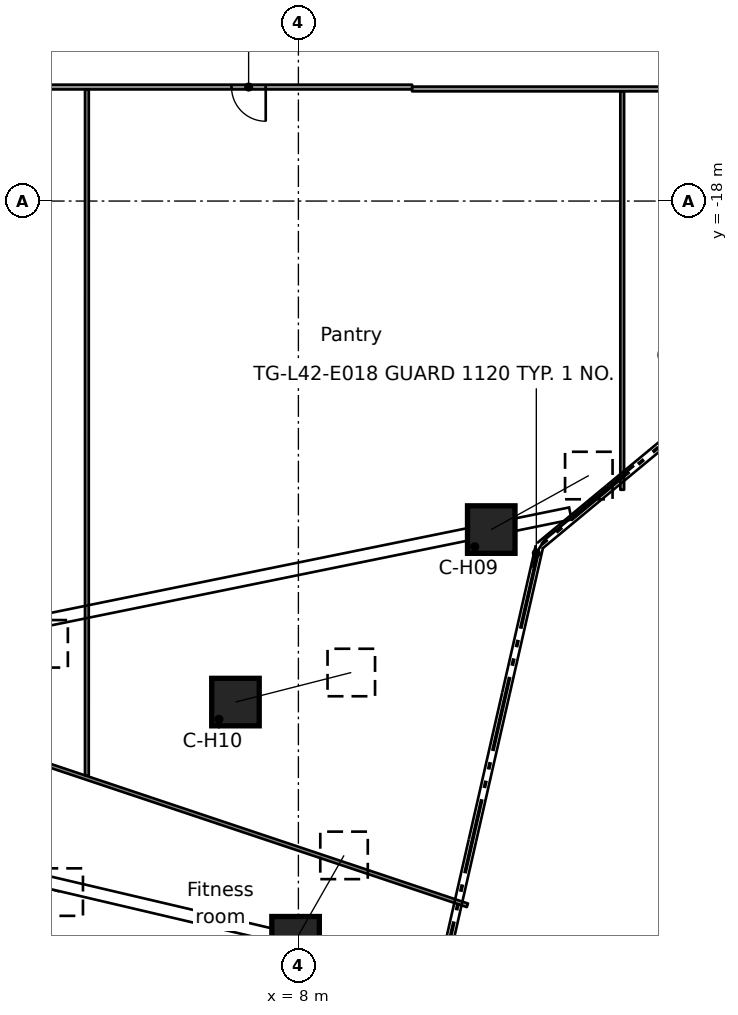
"""IFC4 building model, lengths in metres.
Left out: names, types, materials, properties, quantities, classifications, styles, units other than length and angle.
Written with IfcOpenShell. Run it as: python <this file> out.ifc"""

import sys

from ifc_helpers import new_model, si_unit, direction, frame, frame_2d, origin, origin_2d, place, context, subcontext, project, spatial, rectangle, extrude, element, fill, save


model = new_model("IFC4")
c1 = context("Model", 3, precision=1e-05, world=origin(), true_north=direction((0.0, 1.0)))
c2 = subcontext(c1, "Body", "Model", "MODEL_VIEW")
j1 = project(units=[si_unit("LENGTHUNIT", "METRE"), si_unit("PLANEANGLEUNIT", "RADIAN")], contexts=[c1])
p1 = place(None, origin())
s1 = spatial("IfcSite", under=j1, at=p1, CompositionType="ELEMENT")
p2 = place(p1, origin())
s2 = spatial("IfcBuilding", under=s1, at=p2, CompositionType="ELEMENT")
p3 = place(p2, frame((0.0, 0.0, 163.1)))
s3 = spatial("IfcBuildingStorey", under=s2, at=p3, CompositionType="ELEMENT", Elevation=163.1)
p4 = place(p3, frame((-1.558, -35.226, 0.464), z_axis=(0.712112227691, -0.208786831155, 0.670301599513), x_axis=(0.281350203926, 0.959605159819, 0.0)))
e1 = element("IfcColumn", 1, at=p4, inside=s3, PredefinedType="COLUMN", context=c2, shape_type="SweptSolid", body=[
    extrude(rectangle(XDim=1.25, YDim=1.25, at=origin_2d()), origin(), (0.0, 0.0, 1.0), 4.584),
])
p5 = place(p3, frame((7.926, -37.45, 0.39), z_axis=(0.3093960676, 0.541887482626, 0.781429478281), x_axis=(-0.868418381387, 0.495832143845, 0.0)))
e2 = element("IfcColumn", 2, at=p5, inside=s3, PredefinedType="COLUMN", context=c2, shape_type="SweptSolid", body=[
    extrude(rectangle(XDim=1.25, YDim=1.25, at=origin_2d()), origin(), (0.0, 0.0, 1.0), 4.121),
])
p6 = place(p3, frame((13.075, -26.644, 0.426), z_axis=(0.59651445167, 0.33045141997, 0.731418052818), x_axis=(-0.484583076291, 0.874745244155, 0.0)))
e3 = element("IfcColumn", 3, at=p6, inside=s3, PredefinedType="COLUMN", context=c2, shape_type="SweptSolid", body=[
    extrude(rectangle(XDim=1.25, YDim=1.25, at=origin_2d()), origin(), (0.0, 0.0, 1.0), 4.303),
])
p7 = place(p3, frame((6.344, -31.183, 0.444), z_axis=(0.68893180134, 0.175861085372, 0.703168437683), x_axis=(-0.247335189642, 0.968929978876, 0.0)))
e4 = element("IfcColumn", 4, at=p7, inside=s3, PredefinedType="COLUMN", context=c2, shape_type="SweptSolid", body=[
    extrude(rectangle(XDim=1.25, YDim=1.25, at=origin_2d()), origin(), (0.0, 0.0, 1.0), 4.424),
])
p8 = place(p3, frame((-1.625, -29.634, 0.426), z_axis=(0.681844494604, -0.003687792657, 0.731487857291), x_axis=(0.005408474731, 0.999985374094, 0.0)))
e5 = element("IfcColumn", 5, at=p8, inside=s3, PredefinedType="COLUMN", context=c2, shape_type="SweptSolid", body=[
    extrude(rectangle(XDim=1.25, YDim=1.25, at=origin_2d()), origin(), (0.0, 0.0, 1.0), 4.303),
])
p9 = place(p3, frame((-4.203, -36.872, 0.0), z_axis=(0.0, 0.0, 1.0), x_axis=(0.9483339029, -0.317274027634, 0.0)))
e6 = element("IfcWall", 6, at=p9, inside=s3, PredefinedType="PARTITIONING", context=c2, shape_type="SweptSolid", body=[
    extrude(rectangle(XDim=16.238, YDim=0.1, at=frame_2d((8.119, 0.0))), origin(), (0.0, 0.0, 1.0), 3.56),
])
p10 = place(p3, frame((-3.038, -31.35, 0.0), z_axis=(0.0, 0.0, 1.0), x_axis=(0.948347845644, -0.317232349647, 0.0)))
e7 = element("IfcWall", 7, at=p10, inside=s3, PredefinedType="PARTITIONING", context=c2, shape_type="SweptSolid", body=[
    extrude(rectangle(XDim=16.329, YDim=0.1, at=frame_2d((8.164, 0.0))), origin(), (0.0, 0.0, 1.0), 3.56),
])
p11 = place(p3, frame((21.988, -15.051, 0.0), z_axis=(0.0, 0.0, 1.0), x_axis=(-1.0, 0.0, 0.0)))
e8 = element("IfcWall", 8, at=p11, inside=s3, PredefinedType="PARTITIONING", context=c2, shape_type="SweptSolid", body=[
    extrude(rectangle(XDim=10.997, YDim=0.125, at=frame_2d((5.499, 0.0))), origin(), (0.0, 0.0, 1.0), 3.56),
])
p12 = place(p11, frame((1.788, 0.0, 0.0)))
e9 = element("IfcOpeningElement", 9, at=p12, cuts=e8, PredefinedType="OPENING", context=c2, shape_type="SweptSolid", body=[
    extrude(rectangle(XDim=1.8, YDim=2.1, at=frame_2d((0.9, 1.05))), frame((0.0, 0.073, 0.0), z_axis=(0.0, -1.0, 0.0), x_axis=(1.0, 0.0, 0.0)), (0.0, 0.0, 1.0), 0.145),
])
p13 = place(p3, frame((10.992, -15.0, 0.0), z_axis=(0.0, 0.0, 1.0), x_axis=(-1.0, 0.0, 0.0)))
e10 = element("IfcWall", 10, at=p13, inside=s3, PredefinedType="PARTITIONING", context=c2, shape_type="SweptSolid", body=[
    extrude(rectangle(XDim=17.111, YDim=0.125, at=frame_2d((8.555, 0.0))), origin(), (0.0, 0.0, 1.0), 3.56),
])
p14 = place(p13, frame((12.407, 0.0, 0.0)))
e11 = element("IfcOpeningElement", 11, at=p14, cuts=e10, PredefinedType="OPENING", context=c2, shape_type="SweptSolid", body=[
    extrude(rectangle(XDim=1.1, YDim=2.1, at=frame_2d((0.55, 1.05))), frame((0.0, 0.073, 0.0), z_axis=(0.0, -1.0, 0.0), x_axis=(1.0, 0.0, 0.0)), (0.0, 0.0, 1.0), 0.145),
])
p15 = place(p13, frame((3.852, 0.0, 0.0)))
e12 = element("IfcOpeningElement", 12, at=p15, cuts=e10, PredefinedType="OPENING", context=c2, shape_type="SweptSolid", body=[
    extrude(rectangle(XDim=0.9, YDim=2.1, at=frame_2d((0.45, 1.05))), frame((0.0, 0.073, 0.0), z_axis=(0.0, -1.0, 0.0), x_axis=(1.0, 0.0, 0.0)), (0.0, 0.0, 1.0), 0.145),
])
p16 = place(p3, frame((16.521, -25.597, 0.0), z_axis=(0.0, 0.0, 1.0), x_axis=(0.0, 1.0, 0.0)))
e13 = element("IfcWall", 13, at=p16, inside=s3, PredefinedType="PARTITIONING", context=c2, shape_type="SweptSolid", body=[
    extrude(rectangle(XDim=10.483, YDim=0.1, at=frame_2d((5.241, 0.0))), origin(), (0.0, 0.0, 1.0), 3.56),
])
p17 = place(p3, frame((2.434, -33.112, 0.0), z_axis=(0.0, 0.0, 1.0), x_axis=(5.4103039e-05, 0.999999998536, 0.0)))
e14 = element("IfcWall", 14, at=p17, inside=s3, PredefinedType="PARTITIONING", context=c2, shape_type="SweptSolid", body=[
    extrude(rectangle(XDim=18.05, YDim=0.1, at=frame_2d((9.025, 0.0))), origin(), (0.0, 0.0, 1.0), 3.56),
])
p18 = place(p15, origin())
e15 = element("IfcDoor", 15, at=p18, inside=s3, OperationType="SINGLE_SWING_LEFT", PredefinedType="DOOR", context=c2, shape_type="SweptSolid", body=[
    extrude(rectangle(XDim=0.9, YDim=2.1, at=frame_2d((0.45, 1.05))), frame((0.0, 0.025, 0.0), z_axis=(0.0, -1.0, 0.0), x_axis=(1.0, 0.0, 0.0)), (0.0, 0.0, 1.0), 0.05),
])
fill(e12, e15)
save(model, sys.argv[1])
